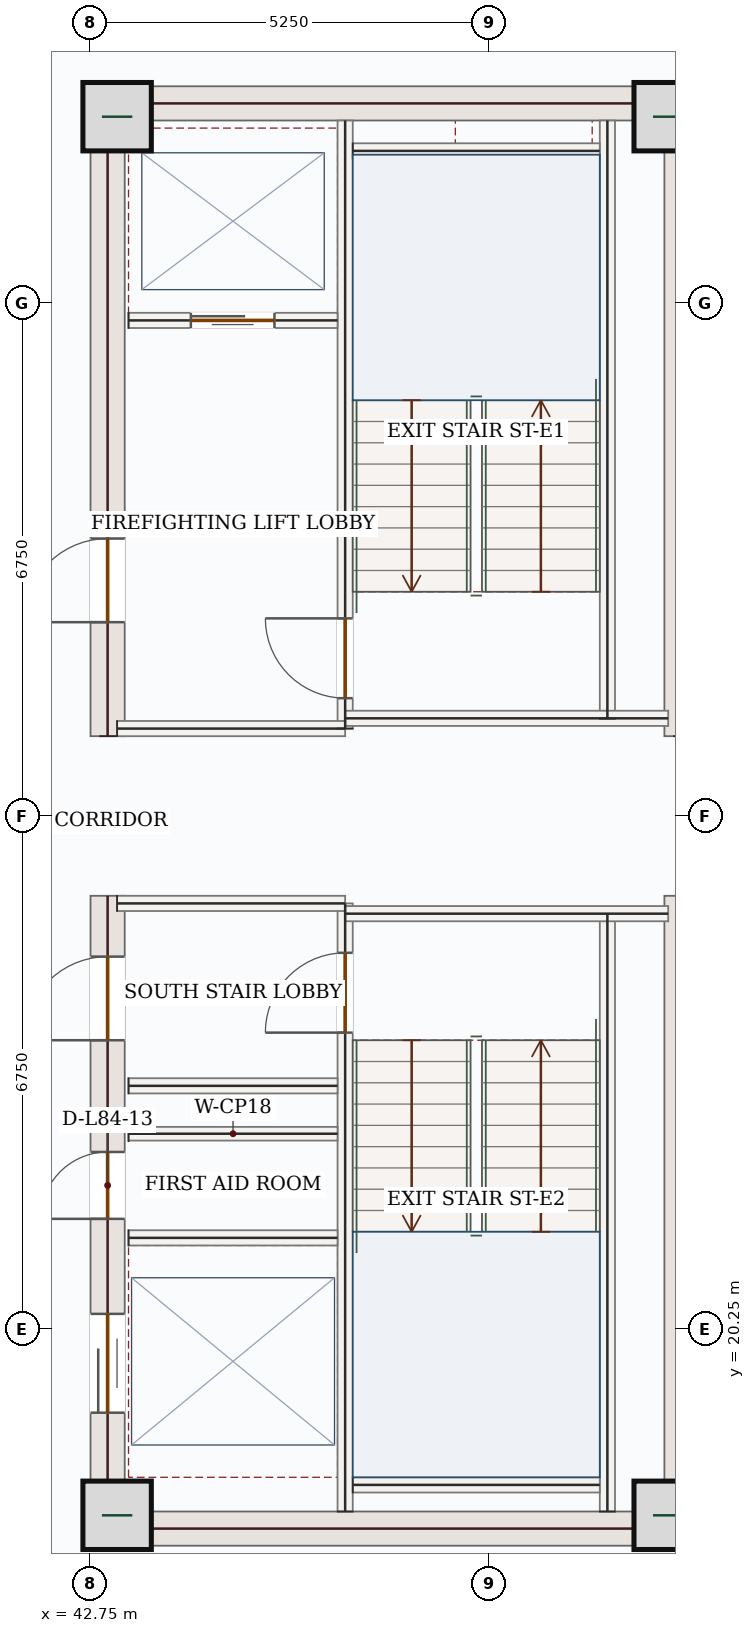
"""IFC4 building model, lengths in metres.
Left out: names, types, materials, properties, quantities, classifications, styles, units other than length and angle.
Written with IfcOpenShell. Run it as: python <this file> out.ifc"""

import sys

from ifc_helpers import new_model, si_unit, direction, frame, frame_2d, origin, origin_2d, place, context, subcontext, project, spatial, rectangle, extrude, source, transform, mapped, element, fill, save


model = new_model("IFC4")
c1 = context("Model", 3, precision=1e-05, world=origin(), true_north=direction((0.0, 1.0)))
c2 = subcontext(c1, "Body", "Model", "MODEL_VIEW")
j1 = project(units=[si_unit("LENGTHUNIT", "METRE"), si_unit("PLANEANGLEUNIT", "RADIAN")], contexts=[c1])
p1 = place(None, origin())
s1 = spatial("IfcSite", under=j1, at=p1, CompositionType="ELEMENT")
p2 = place(p1, origin())
s2 = spatial("IfcBuilding", under=s1, at=p2, CompositionType="ELEMENT")
p3 = place(p2, frame((0.0, 0.0, 346.05)))
s3 = spatial("IfcBuildingStorey", under=s2, at=p3, CompositionType="ELEMENT", Elevation=346.05)
p4 = place(p3, frame((42.975, 17.4, 0.0), z_axis=(0.0, 0.0, 1.0), x_axis=(0.0, 1.0, 0.0)))
e1 = element("IfcWall", 1, at=p4, inside=s3, PredefinedType="SHEAR", context=c2, shape_type="SweptSolid", body=[
    extrude(rectangle(XDim=8.55, YDim=0.45, at=frame_2d((4.275, 0.0))), origin(), (0.0, 0.0, 1.0), 3.5),
])
p5 = place(p4, frame((6.65, 0.0, 0.0)))
e2 = element("IfcOpeningElement", 2, at=p5, cuts=e1, PredefinedType="OPENING", context=c2, shape_type="SweptSolid", body=[
    extrude(rectangle(XDim=1.1, YDim=2.2, at=frame_2d((0.55, 1.1))), frame((0.0, 0.235, 0.0), z_axis=(0.0, -1.0, 0.0), x_axis=(1.0, 0.0, 0.0)), (0.0, 0.0, 1.0), 0.47),
])
p6 = place(p4, frame((1.75, 0.0, 0.0)))
e3 = element("IfcOpeningElement", 3, at=p6, cuts=e1, PredefinedType="OPENING", context=c2, shape_type="SweptSolid", body=[
    extrude(rectangle(XDim=1.3, YDim=2.2, at=frame_2d((0.65, 1.1))), frame((0.0, 0.235, 0.0), z_axis=(0.0, -1.0, 0.0), x_axis=(1.0, 0.0, 0.0)), (0.0, 0.0, 1.0), 0.47),
])
p7 = place(p4, frame((4.3, 0.0, 0.0)))
e4 = element("IfcOpeningElement", 4, at=p7, cuts=e1, PredefinedType="OPENING", context=c2, shape_type="SweptSolid", body=[
    extrude(rectangle(XDim=0.88, YDim=2.1, at=frame_2d((0.44, 1.05))), frame((0.0, 0.235, 0.0), z_axis=(0.0, -1.0, 0.0), x_axis=(1.0, 0.0, 0.0)), (0.0, 0.0, 1.0), 0.47),
])
p8 = place(p3, frame((42.975, 28.05, 0.0), z_axis=(0.0, 0.0, 1.0), x_axis=(0.0, 1.0, 0.0)))
e5 = element("IfcWall", 5, at=p8, inside=s3, PredefinedType="SHEAR", context=c2, shape_type="SweptSolid", body=[
    extrude(rectangle(XDim=8.55, YDim=0.45, at=frame_2d((4.275, 0.0))), origin(), (0.0, 0.0, 1.0), 3.5),
])
p9 = place(p8, frame((1.5, 0.0, 0.0)))
e6 = element("IfcOpeningElement", 6, at=p9, cuts=e5, PredefinedType="OPENING", context=c2, shape_type="SweptSolid", body=[
    extrude(rectangle(XDim=1.1, YDim=2.2, at=frame_2d((0.55, 1.1))), frame((0.0, 0.235, 0.0), z_axis=(0.0, -1.0, 0.0), x_axis=(1.0, 0.0, 0.0)), (0.0, 0.0, 1.0), 0.47),
])
m1 = source(origin(), c2, "Body", "SweptSolid", [
    extrude(rectangle(XDim=8.55, YDim=0.45, at=frame_2d((4.275, 0.0))), origin(), (0.0, 0.0, 1.0), 3.5),
])
for number, where, z_axis, x_axis in (
    (7, (50.525, 17.4, 0.0), (0.0, 0.0, 1.0), (0.0, 1.0, 0.0)),
    (8, (50.525, 28.05, 0.0), (0.0, 0.0, 1.0), (0.0, 1.0, 0.0)),
):
    element("IfcWall", number, at=place(p3, frame(where, z_axis=z_axis, x_axis=x_axis)), inside=s3, PredefinedType="SHEAR", context=c2, shape_type="MappedRepresentation", body=[
        mapped(m1, transform((0.0, 0.0, 0.0), x_axis=(1.0, 0.0, 0.0), y_axis=(0.0, 1.0, 0.0), z_axis=(0.0, 0.0, 1.0), scale=1.0)),
    ])
m2 = source(origin(), c2, "Body", "SweptSolid", [
    extrude(rectangle(XDim=7.1, YDim=0.45, at=frame_2d((3.55, 0.0))), origin(), (0.0, 0.0, 1.0), 3.5),
])
for number, where, z_axis, x_axis in (
    (9, (43.2, 17.625, 0.0), (0.0, 0.0, 1.0), (1.0, 0.0, 0.0)),
    (10, (43.2, 36.375, 0.0), (0.0, 0.0, 1.0), (1.0, 0.0, 0.0)),
):
    element("IfcWall", number, at=place(p3, frame(where, z_axis=z_axis, x_axis=x_axis)), inside=s3, PredefinedType="SHEAR", context=c2, shape_type="MappedRepresentation", body=[
        mapped(m2, transform((0.0, 0.0, 0.0), x_axis=(1.0, 0.0, 0.0), y_axis=(0.0, 1.0, 0.0), z_axis=(0.0, 0.0, 1.0), scale=1.0)),
    ])
m3 = source(origin(), c2, "Body", "SweptSolid", [
    extrude(rectangle(XDim=0.9, YDim=0.9, at=origin_2d()), origin(), (0.0, 0.0, 1.0), 3.75),
])
for number, where, z_axis, x_axis in (
    (11, (43.1, 17.8, 0.0), (0.0, 0.0, 1.0), (1.0, 0.0, 0.0)),
    (12, (50.35, 17.8, 0.0), (0.0, 0.0, 1.0), (1.0, 0.0, 0.0)),
    (13, (43.1, 36.2, 0.0), (0.0, 0.0, 1.0), (1.0, 0.0, 0.0)),
    (14, (50.35, 36.2, 0.0), (0.0, 0.0, 1.0), (1.0, 0.0, 0.0)),
):
    element("IfcColumn", number, at=place(p3, frame(where, z_axis=z_axis, x_axis=x_axis)), inside=s3, PredefinedType="COLUMN", context=c2, shape_type="MappedRepresentation", body=[
        mapped(m3, transform((0.0, 0.0, 0.0), x_axis=(1.0, 0.0, 0.0), y_axis=(0.0, 1.0, 0.0), z_axis=(0.0, 0.0, 1.0), scale=1.0)),
    ])
p10 = place(p3, frame((49.833, 39.006, 0.0), z_axis=(0.0, 0.0, 1.0), x_axis=(0.681733754317, -0.731600361006, 0.0)))
e15 = element("IfcWall", 15, at=p10, inside=s3, PredefinedType="SOLIDWALL", context=c2, shape_type="SweptSolid", body=[
    extrude(rectangle(XDim=4.734, YDim=0.28, at=frame_2d((2.367, 0.0))), origin(), (0.0, 0.0, 1.0), 3.5),
])
p11 = place(p10, frame((1.617, 0.0, 0.85)))
e16 = element("IfcOpeningElement", 16, at=p11, cuts=e15, PredefinedType="OPENING", context=c2, shape_type="SweptSolid", body=[
    extrude(rectangle(XDim=1.5, YDim=1.5, at=frame_2d((0.75, 0.75))), frame((0.0, 0.15, 0.0), z_axis=(0.0, -1.0, 0.0), x_axis=(1.0, 0.0, 0.0)), (0.0, 0.0, 1.0), 0.3),
])
m4 = source(origin(), c2, "Body", "SweptSolid", [
    extrude(rectangle(XDim=7.87, YDim=0.2, at=frame_2d((3.935, 0.0))), origin(), (0.0, 0.0, 1.0), 3.5),
])
for number, where, z_axis, x_axis in (
    (17, (49.55, 17.85, 0.0), (0.0, 0.0, 1.0), (0.0, 1.0, 0.0)),
    (18, (49.55, 28.28, 0.0), (0.0, 0.0, 1.0), (0.0, 1.0, 0.0)),
):
    element("IfcWall", number, at=place(p3, frame(where, z_axis=z_axis, x_axis=x_axis)), inside=s3, PredefinedType="SOLIDWALL", context=c2, shape_type="MappedRepresentation", body=[
        mapped(m4, transform((0.0, 0.0, 0.0), x_axis=(1.0, 0.0, 0.0), y_axis=(0.0, 1.0, 0.0), z_axis=(0.0, 0.0, 1.0), scale=1.0)),
    ])
p12 = place(p3, frame((46.1, 17.85, 0.0), z_axis=(0.0, 0.0, 1.0), x_axis=(0.0, 1.0, 0.0)))
e19 = element("IfcWall", 19, at=p12, inside=s3, PredefinedType="SOLIDWALL", context=c2, shape_type="SweptSolid", body=[
    extrude(rectangle(XDim=8.0, YDim=0.2, at=frame_2d((4.0, 0.0))), origin(), (0.0, 0.0, 1.0), 3.5),
])
p13 = place(p12, frame((6.3, 0.0, 0.0)))
e20 = element("IfcOpeningElement", 20, at=p13, cuts=e19, PredefinedType="OPENING", context=c2, shape_type="SweptSolid", body=[
    extrude(rectangle(XDim=1.05, YDim=2.15, at=frame_2d((0.525, 1.075))), frame((0.0, 0.11, 0.0), z_axis=(0.0, -1.0, 0.0), x_axis=(1.0, 0.0, 0.0)), (0.0, 0.0, 1.0), 0.22),
])
p14 = place(p3, frame((46.1, 28.15, 0.0), z_axis=(0.0, 0.0, 1.0), x_axis=(0.0, 1.0, 0.0)))
e21 = element("IfcWall", 21, at=p14, inside=s3, PredefinedType="SOLIDWALL", context=c2, shape_type="SweptSolid", body=[
    extrude(rectangle(XDim=8.0, YDim=0.2, at=frame_2d((4.0, 0.0))), origin(), (0.0, 0.0, 1.0), 3.5),
])
p15 = place(p14, frame((0.4, 0.0, 0.0)))
e22 = element("IfcOpeningElement", 22, at=p15, cuts=e21, PredefinedType="OPENING", context=c2, shape_type="SweptSolid", body=[
    extrude(rectangle(XDim=1.05, YDim=2.15, at=frame_2d((0.525, 1.075))), frame((0.0, 0.11, 0.0), z_axis=(0.0, -1.0, 0.0), x_axis=(1.0, 0.0, 0.0)), (0.0, 0.0, 1.0), 0.22),
])
m5 = source(origin(), c2, "Body", "SweptSolid", [
    extrude(rectangle(XDim=3.0, YDim=0.2, at=frame_2d((1.5, 0.0))), origin(), (0.0, 0.0, 1.0), 3.5),
])
p16 = place(p3, frame((43.1, 25.85, 0.0), z_axis=(0.0, 0.0, 1.0), x_axis=(1.0, 0.0, 0.0)))
e23 = element("IfcWall", 23, at=p16, inside=s3, PredefinedType="SOLIDWALL", context=c2, shape_type="MappedRepresentation", body=[
    mapped(m5, transform((0.0, 0.0, 0.0), x_axis=(1.0, 0.0, 0.0), y_axis=(0.0, 1.0, 0.0), z_axis=(0.0, 0.0, 1.0), scale=1.0)),
])
m6 = source(origin(), c2, "Body", "SweptSolid", [
    extrude(rectangle(XDim=4.25, YDim=0.2, at=frame_2d((2.125, 0.0))), origin(), (0.0, 0.0, 1.0), 3.5),
])
p17 = place(p3, frame((46.1, 25.715, 0.0), z_axis=(0.0, 0.0, 1.0), x_axis=(1.0, 0.0, 0.0)))
e24 = element("IfcWall", 24, at=p17, inside=s3, PredefinedType="SOLIDWALL", context=c2, shape_type="MappedRepresentation", body=[
    mapped(m6, transform((0.0, 0.0, 0.0), x_axis=(1.0, 0.0, 0.0), y_axis=(0.0, 1.0, 0.0), z_axis=(0.0, 0.0, 1.0), scale=1.0)),
])
p18 = place(p3, frame((43.1, 28.15, 0.0), z_axis=(0.0, 0.0, 1.0), x_axis=(1.0, 0.0, 0.0)))
e25 = element("IfcWall", 25, at=p18, inside=s3, PredefinedType="SOLIDWALL", context=c2, shape_type="MappedRepresentation", body=[
    mapped(m5, transform((0.0, 0.0, 0.0), x_axis=(1.0, 0.0, 0.0), y_axis=(0.0, 1.0, 0.0), z_axis=(0.0, 0.0, 1.0), scale=1.0)),
])
p19 = place(p3, frame((46.1, 28.285, 0.0), z_axis=(0.0, 0.0, 1.0), x_axis=(1.0, 0.0, 0.0)))
e26 = element("IfcWall", 26, at=p19, inside=s3, PredefinedType="SOLIDWALL", context=c2, shape_type="MappedRepresentation", body=[
    mapped(m6, transform((0.0, 0.0, 0.0), x_axis=(1.0, 0.0, 0.0), y_axis=(0.0, 1.0, 0.0), z_axis=(0.0, 0.0, 1.0), scale=1.0)),
])
m7 = source(origin(), c2, "Body", "SweptSolid", [
    extrude(rectangle(XDim=3.25, YDim=0.2, at=frame_2d((1.625, 0.0))), origin(), (0.0, 0.0, 1.0), 3.5),
])
for number, where, z_axis, x_axis in (
    (27, (46.2, 35.75, 0.0), (0.0, 0.0, 1.0), (1.0, 0.0, 0.0)),
    (28, (46.2, 18.2, 0.0), (0.0, 0.0, 1.0), (1.0, 0.0, 0.0)),
):
    element("IfcWall", number, at=place(p3, frame(where, z_axis=z_axis, x_axis=x_axis)), inside=s3, PredefinedType="SOLIDWALL", context=c2, shape_type="MappedRepresentation", body=[
        mapped(m7, transform((0.0, 0.0, 0.0), x_axis=(1.0, 0.0, 0.0), y_axis=(0.0, 1.0, 0.0), z_axis=(0.0, 0.0, 1.0), scale=1.0)),
    ])
p20 = place(p3, frame((43.25, 33.52, 0.0), z_axis=(0.0, 0.0, 1.0), x_axis=(1.0, 0.0, 0.0)))
e29 = element("IfcWall", 29, at=p20, inside=s3, PredefinedType="SOLIDWALL", context=c2, shape_type="SweptSolid", body=[
    extrude(rectangle(XDim=2.75, YDim=0.2, at=frame_2d((1.375, 0.0))), origin(), (0.0, 0.0, 1.0), 3.5),
])
p21 = place(p20, frame((0.82, 0.0, 0.0)))
e30 = element("IfcOpeningElement", 30, at=p21, cuts=e29, PredefinedType="OPENING", context=c2, shape_type="SweptSolid", body=[
    extrude(rectangle(XDim=1.1, YDim=2.15, at=frame_2d((0.55, 1.075))), frame((0.0, 0.11, 0.0), z_axis=(0.0, -1.0, 0.0), x_axis=(1.0, 0.0, 0.0)), (0.0, 0.0, 1.0), 0.22),
])
m8 = source(origin(), c2, "Body", "SweptSolid", [
    extrude(rectangle(XDim=2.75, YDim=0.2, at=frame_2d((1.375, 0.0))), origin(), (0.0, 0.0, 1.0), 3.5),
])
for number, where, z_axis, x_axis in (
    (31, (43.25, 23.45, 0.0), (0.0, 0.0, 1.0), (1.0, 0.0, 0.0)),
    (32, (43.25, 21.45, 0.0), (0.0, 0.0, 1.0), (1.0, 0.0, 0.0)),
):
    element("IfcWall", number, at=place(p3, frame(where, z_axis=z_axis, x_axis=x_axis)), inside=s3, PredefinedType="SOLIDWALL", context=c2, shape_type="MappedRepresentation", body=[
        mapped(m8, transform((0.0, 0.0, 0.0), x_axis=(1.0, 0.0, 0.0), y_axis=(0.0, 1.0, 0.0), z_axis=(0.0, 0.0, 1.0), scale=1.0)),
    ])
m9 = source(origin(), c2, "Body", "SweptSolid", [
    extrude(rectangle(XDim=2.75, YDim=0.18, at=frame_2d((1.375, 0.0))), origin(), (0.0, 0.0, 1.0), 3.5),
])
p22 = place(p3, frame((43.25, 22.82, 0.0), z_axis=(0.0, 0.0, 1.0), x_axis=(1.0, 0.0, 0.0)))
e33 = element("IfcWall", 33, at=p22, inside=s3, PredefinedType="PARTITIONING", context=c2, shape_type="MappedRepresentation", body=[
    mapped(m9, transform((0.0, 0.0, 0.0), x_axis=(1.0, 0.0, 0.0), y_axis=(0.0, 1.0, 0.0), z_axis=(0.0, 0.0, 1.0), scale=1.0)),
])
m10 = source(origin(), c2, "Body", "SweptSolid", [
    extrude(rectangle(XDim=1.05, YDim=2.15, at=frame_2d((0.525, 1.075))), frame((0.0, 0.025, 0.0), z_axis=(0.0, -1.0, 0.0), x_axis=(1.0, 0.0, 0.0)), (0.0, 0.0, 1.0), 0.05),
])
p23 = place(p15, origin())
e34 = element("IfcDoor", 34, at=p23, inside=s3, OperationType="SINGLE_SWING_RIGHT", PredefinedType="DOOR", context=c2, shape_type="MappedRepresentation", body=[
    mapped(m10, transform((0.0, 0.0, 0.0), x_axis=(1.0, 0.0, 0.0), y_axis=(0.0, 1.0, 0.0), z_axis=(0.0, 0.0, 1.0), scale=1.0)),
])
fill(e22, e34)
p24 = place(p13, origin())
e35 = element("IfcDoor", 35, at=p24, inside=s3, OperationType="SINGLE_SWING_LEFT", PredefinedType="DOOR", context=c2, shape_type="MappedRepresentation", body=[
    mapped(m10, transform((0.0, 0.0, 0.0), x_axis=(1.0, 0.0, 0.0), y_axis=(0.0, 1.0, 0.0), z_axis=(0.0, 0.0, 1.0), scale=1.0)),
])
fill(e20, e35)
m11 = source(origin(), c2, "Body", "SweptSolid", [
    extrude(rectangle(XDim=1.1, YDim=2.15, at=frame_2d((0.55, 1.075))), frame((0.0, 0.025, 0.0), z_axis=(0.0, -1.0, 0.0), x_axis=(1.0, 0.0, 0.0)), (0.0, 0.0, 1.0), 0.05),
])
p25 = place(p21, origin())
e36 = element("IfcDoor", 36, at=p25, inside=s3, OperationType="DOUBLE_DOOR_SLIDING", PredefinedType="DOOR", context=c2, shape_type="MappedRepresentation", body=[
    mapped(m11, transform((0.0, 0.0, 0.0), x_axis=(1.0, 0.0, 0.0), y_axis=(0.0, 1.0, 0.0), z_axis=(0.0, 0.0, 1.0), scale=1.0)),
])
fill(e30, e36)
m12 = source(origin(), c2, "Body", "SweptSolid", [
    extrude(rectangle(XDim=1.1, YDim=2.2, at=frame_2d((0.55, 1.1))), frame((0.0, 0.025, 0.0), z_axis=(0.0, -1.0, 0.0), x_axis=(1.0, 0.0, 0.0)), (0.0, 0.0, 1.0), 0.05),
])
p26 = place(p9, origin())
e37 = element("IfcDoor", 37, at=p26, inside=s3, OperationType="SINGLE_SWING_LEFT", PredefinedType="DOOR", context=c2, shape_type="MappedRepresentation", body=[
    mapped(m12, transform((0.0, 0.0, 0.0), x_axis=(1.0, 0.0, 0.0), y_axis=(0.0, 1.0, 0.0), z_axis=(0.0, 0.0, 1.0), scale=1.0)),
])
fill(e6, e37)
p27 = place(p5, origin())
e38 = element("IfcDoor", 38, at=p27, inside=s3, OperationType="SINGLE_SWING_LEFT", PredefinedType="DOOR", context=c2, shape_type="MappedRepresentation", body=[
    mapped(m12, transform((0.0, 0.0, 0.0), x_axis=(1.0, 0.0, 0.0), y_axis=(0.0, 1.0, 0.0), z_axis=(0.0, 0.0, 1.0), scale=1.0)),
])
fill(e2, e38)
m13 = source(origin(), c2, "Body", "SweptSolid", [
    extrude(rectangle(XDim=1.3, YDim=2.2, at=frame_2d((0.65, 1.1))), frame((0.0, 0.025, 0.0), z_axis=(0.0, -1.0, 0.0), x_axis=(1.0, 0.0, 0.0)), (0.0, 0.0, 1.0), 0.05),
])
p28 = place(p6, origin())
e39 = element("IfcDoor", 39, at=p28, inside=s3, OperationType="DOUBLE_DOOR_SLIDING", PredefinedType="DOOR", context=c2, shape_type="MappedRepresentation", body=[
    mapped(m13, transform((0.0, 0.0, 0.0), x_axis=(1.0, 0.0, 0.0), y_axis=(0.0, 1.0, 0.0), z_axis=(0.0, 0.0, 1.0), scale=1.0)),
])
fill(e3, e39)
m14 = source(origin(), c2, "Body", "SweptSolid", [
    extrude(rectangle(XDim=0.88, YDim=2.1, at=frame_2d((0.44, 1.05))), frame((0.0, 0.025, 0.0), z_axis=(0.0, -1.0, 0.0), x_axis=(1.0, 0.0, 0.0)), (0.0, 0.0, 1.0), 0.05),
])
p29 = place(p7, origin())
e40 = element("IfcDoor", 40, at=p29, inside=s3, OperationType="SINGLE_SWING_LEFT", PredefinedType="DOOR", context=c2, shape_type="MappedRepresentation", body=[
    mapped(m14, transform((0.0, 0.0, 0.0), x_axis=(1.0, 0.0, 0.0), y_axis=(0.0, 1.0, 0.0), z_axis=(0.0, 0.0, 1.0), scale=1.0)),
])
fill(e4, e40)
save(model, sys.argv[1])
